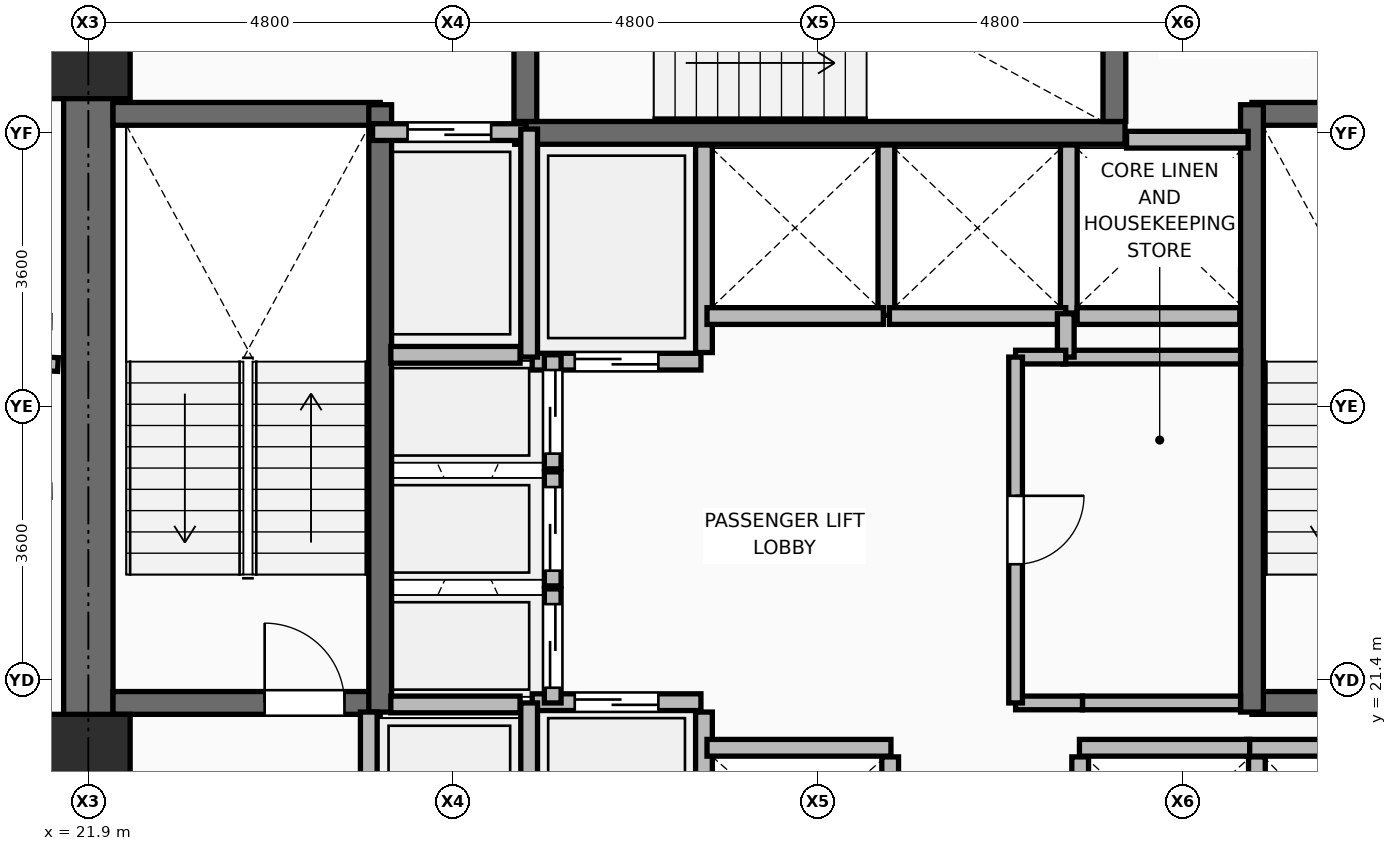
"""IFC4 building model, lengths in metres.
Left out: names, types, materials, properties, quantities, classifications, styles, units other than length and angle.
Written with IfcOpenShell. Run it as: python <this file> out.ifc"""

import sys

from ifc_helpers import new_model, si_unit, direction, frame, frame_2d, origin, origin_2d, place, context, subcontext, project, spatial, rectangle, extrude, element, fill, save


model = new_model("IFC4")
c1 = context("Model", 3, precision=1e-05, world=origin(), true_north=direction((0.0, 1.0)))
c2 = subcontext(c1, "Body", "Model", "MODEL_VIEW")
j1 = project(units=[si_unit("LENGTHUNIT", "METRE"), si_unit("PLANEANGLEUNIT", "RADIAN")], contexts=[c1])
p1 = place(None, origin())
s1 = spatial("IfcSite", under=j1, at=p1, CompositionType="ELEMENT")
p2 = place(p1, origin())
s2 = spatial("IfcBuilding", under=s1, at=p2, CompositionType="ELEMENT")
p3 = place(p2, frame((0.0, 0.0, 60.75)))
s3 = spatial("IfcBuildingStorey", under=s2, at=p3, CompositionType="ELEMENT", Elevation=60.75)
for number, where, z_axis, x_axis in (
    (1, (21.9, 20.4, 0.0), (0.0, 0.0, 1.0), (1.0, 0.0, 0.0)),
    (2, (21.9, 29.6, 0.0), (0.0, 0.0, 1.0), (1.0, 0.0, 0.0)),
):
    element("IfcColumn", number, at=place(p3, frame(where, z_axis=z_axis, x_axis=x_axis)), inside=s3, PredefinedType="COLUMN", context=c2, shape_type="SweptSolid", body=[
        extrude(rectangle(XDim=1.1, YDim=1.1, at=origin_2d()), origin(), (0.0, 0.0, 1.0), 3.75),
    ])
p4 = place(p3, frame((30.0, 18.08, 0.0), z_axis=(0.0, 0.0, 1.0), x_axis=(0.0, 1.0, 0.0)))
e3 = element("IfcWall", 3, at=p4, inside=s3, PredefinedType="PARTITIONING", context=c2, shape_type="SweptSolid", body=[
    extrude(rectangle(XDim=2.9, YDim=0.22, at=frame_2d((1.45, 0.0))), origin(), (0.0, 0.0, 1.0), 3.545),
])
for number, where, z_axis, x_axis in (
    (4, (32.45, 17.92, 0.0), (0.0, 0.0, 1.0), (0.0, 1.0, 0.0)),
    (5, (34.95, 17.92, 0.0), (0.0, 0.0, 1.0), (0.0, 1.0, 0.0)),
):
    element("IfcWall", number, at=place(p3, frame(where, z_axis=z_axis, x_axis=x_axis)), inside=s3, PredefinedType="PARTITIONING", context=c2, shape_type="SweptSolid", body=[
        extrude(rectangle(XDim=2.47, YDim=0.22, at=frame_2d((1.235, 0.0))), origin(), (0.0, 0.0, 1.0), 2.928),
    ])
p5 = place(p3, frame((37.275, 18.08, 0.0), z_axis=(0.0, 0.0, 1.0), x_axis=(0.0, 1.0, 0.0)))
e6 = element("IfcWall", 6, at=p5, inside=s3, PredefinedType="PARTITIONING", context=c2, shape_type="SweptSolid", body=[
    extrude(rectangle(XDim=2.31, YDim=0.22, at=frame_2d((1.155, 0.0))), origin(), (0.0, 0.0, 1.0), 3.545),
])
p6 = place(p3, frame((30.0, 25.71, 0.0), z_axis=(0.0, 0.0, 1.0), x_axis=(0.0, 1.0, 0.0)))
e7 = element("IfcWall", 7, at=p6, inside=s3, PredefinedType="PARTITIONING", context=c2, shape_type="SweptSolid", body=[
    extrude(rectangle(XDim=2.73, YDim=0.22, at=frame_2d((1.365, 0.0))), origin(), (0.0, 0.0, 1.0), 3.545),
])
p7 = place(p3, frame((32.4, 26.2, 0.0), z_axis=(0.0, 0.0, 1.0), x_axis=(0.0, 1.0, 0.0)))
e8 = element("IfcWall", 8, at=p7, inside=s3, PredefinedType="PARTITIONING", context=c2, shape_type="SweptSolid", body=[
    extrude(rectangle(XDim=2.24, YDim=0.22, at=frame_2d((1.12, 0.0))), origin(), (0.0, 0.0, 1.0), 3.545),
])
p8 = place(p3, frame((34.8, 26.23, 0.0), z_axis=(0.0, 0.0, 1.0), x_axis=(0.0, 1.0, 0.0)))
e9 = element("IfcWall", 9, at=p8, inside=s3, PredefinedType="PARTITIONING", context=c2, shape_type="SweptSolid", body=[
    extrude(rectangle(XDim=2.21, YDim=0.22, at=frame_2d((1.105, 0.0))), origin(), (0.0, 0.0, 1.0), 3.545),
])
p9 = place(p3, frame((34.91, 26.19, 0.0), z_axis=(0.0, 0.0, 1.0), x_axis=(1.0, 0.0, 0.0)))
e10 = element("IfcWall", 10, at=p9, inside=s3, PredefinedType="PARTITIONING", context=c2, shape_type="SweptSolid", body=[
    extrude(rectangle(XDim=2.14, YDim=0.22, at=frame_2d((1.07, 0.0))), origin(), (0.0, 0.0, 1.0), 3.545),
])
p10 = place(p3, frame((21.9, 18.125, 0.0), z_axis=(0.0, 0.0, 1.0), x_axis=(0.0, 1.0, 0.0)))
e11 = element("IfcWall", 11, at=p10, inside=s3, PredefinedType="SHEAR", context=c2, shape_type="SweptSolid", body=[
    extrude(rectangle(XDim=14.0, YDim=0.65, at=frame_2d((7.0, 0.0))), origin(), (0.0, 0.0, 1.0), 3.57),
])
p11 = place(p3, frame((22.225, 21.1, 0.0), z_axis=(0.0, 0.0, 1.0), x_axis=(1.0, 0.0, 0.0)))
e12 = element("IfcWall", 12, at=p11, inside=s3, PredefinedType="SHEAR", context=c2, shape_type="SweptSolid", body=[
    extrude(rectangle(XDim=3.515, YDim=0.3, at=frame_2d((1.757, 0.0))), origin(), (0.0, 0.0, 1.0), 3.57),
])
p12 = place(p11, frame((1.995, 0.0, 0.0)))
e13 = element("IfcOpeningElement", 13, at=p12, cuts=e12, PredefinedType="OPENING", context=c2, shape_type="SweptSolid", body=[
    extrude(rectangle(XDim=1.05, YDim=2.1, at=frame_2d((0.525, 1.05))), frame((0.0, 0.16, 0.0), z_axis=(0.0, -1.0, 0.0), x_axis=(1.0, 0.0, 0.0)), (0.0, 0.0, 1.0), 0.32),
])
p13 = place(p3, frame((22.225, 28.85, 0.0), z_axis=(0.0, 0.0, 1.0), x_axis=(1.0, 0.0, 0.0)))
e14 = element("IfcWall", 14, at=p13, inside=s3, PredefinedType="SHEAR", context=c2, shape_type="SweptSolid", body=[
    extrude(rectangle(XDim=3.515, YDim=0.3, at=frame_2d((1.757, 0.0))), origin(), (0.0, 0.0, 1.0), 3.57),
])
p14 = place(p3, frame((25.74, 20.98, 0.0), z_axis=(0.0, 0.0, 1.0), x_axis=(0.0, 1.0, 0.0)))
e15 = element("IfcWall", 15, at=p14, inside=s3, PredefinedType="SHEAR", context=c2, shape_type="SweptSolid", body=[
    extrude(rectangle(XDim=7.99, YDim=0.3, at=frame_2d((3.995, 0.0))), origin(), (0.0, 0.0, 1.0), 3.57),
])
for number, where, z_axis, x_axis in (
    (16, (37.21, 21.1, 0.0), (0.0, 0.0, 1.0), (1.0, 0.0, 0.0)),
    (17, (37.21, 28.85, 0.0), (0.0, 0.0, 1.0), (1.0, 0.0, 0.0)),
):
    element("IfcWall", number, at=place(p3, frame(where, z_axis=z_axis, x_axis=x_axis)), inside=s3, PredefinedType="SHEAR", context=c2, shape_type="SweptSolid", body=[
        extrude(rectangle(XDim=3.565, YDim=0.3, at=frame_2d((1.782, 0.0))), origin(), (0.0, 0.0, 1.0), 3.57),
    ])
p15 = place(p3, frame((37.21, 20.98, 0.0), z_axis=(0.0, 0.0, 1.0), x_axis=(0.0, 1.0, 0.0)))
e18 = element("IfcWall", 18, at=p15, inside=s3, PredefinedType="SHEAR", context=c2, shape_type="SweptSolid", body=[
    extrude(rectangle(XDim=7.99, YDim=0.3, at=frame_2d((3.995, 0.0))), origin(), (0.0, 0.0, 1.0), 3.57),
])
p16 = place(p3, frame((27.51, 28.6, 0.0), z_axis=(0.0, 0.0, 1.0), x_axis=(1.0, 0.0, 0.0)))
e19 = element("IfcWall", 19, at=p16, inside=s3, PredefinedType="SHEAR", context=c2, shape_type="SweptSolid", body=[
    extrude(rectangle(XDim=8.03, YDim=0.3, at=frame_2d((4.015, 0.0))), origin(), (0.0, 0.0, 1.0), 3.57),
])
p17 = place(p3, frame((27.65, 28.75, 0.0), z_axis=(0.0, 0.0, 1.0), x_axis=(0.0, 1.0, 0.0)))
e20 = element("IfcWall", 20, at=p17, inside=s3, PredefinedType="SHEAR", context=c2, shape_type="SweptSolid", body=[
    extrude(rectangle(XDim=3.375, YDim=0.3, at=frame_2d((1.688, 0.0))), origin(), (0.0, 0.0, 1.0), 3.57),
])
p18 = place(p17, frame((1.0, 0.0, 0.0)))
e21 = element("IfcOpeningElement", 21, at=p18, cuts=e20, PredefinedType="OPENING", context=c2, shape_type="SweptSolid", body=[
    extrude(rectangle(XDim=1.05, YDim=2.1, at=frame_2d((0.525, 1.05))), frame((0.0, 0.16, 0.0), z_axis=(0.0, -1.0, 0.0), x_axis=(1.0, 0.0, 0.0)), (0.0, 0.0, 1.0), 0.32),
])
p19 = place(p3, frame((35.4, 28.75, 0.0), z_axis=(0.0, 0.0, 1.0), x_axis=(0.0, 1.0, 0.0)))
e22 = element("IfcWall", 22, at=p19, inside=s3, PredefinedType="SHEAR", context=c2, shape_type="SweptSolid", body=[
    extrude(rectangle(XDim=3.375, YDim=0.3, at=frame_2d((1.688, 0.0))), origin(), (0.0, 0.0, 1.0), 3.57),
])
p20 = place(p3, frame((25.59, 18.22, 0.0), z_axis=(0.0, 0.0, 1.0), x_axis=(0.0, 1.0, 0.0)))
e23 = element("IfcWall", 23, at=p20, inside=s3, PredefinedType="PARTITIONING", context=c2, shape_type="SweptSolid", body=[
    extrude(rectangle(XDim=2.76, YDim=0.22, at=frame_2d((1.38, 0.0))), origin(), (0.0, 0.0, 1.0), 3.55),
])
p21 = place(p20, frame((0.83, 0.0, 0.0)))
e24 = element("IfcOpeningElement", 24, at=p21, cuts=e23, PredefinedType="OPENING", context=c2, shape_type="SweptSolid", body=[
    extrude(rectangle(XDim=1.1, YDim=2.2, at=frame_2d((0.55, 1.1))), frame((0.0, 0.12, 0.0), z_axis=(0.0, -1.0, 0.0), x_axis=(1.0, 0.0, 0.0)), (0.0, 0.0, 1.0), 0.24),
])
p22 = place(p3, frame((25.64, 28.61, 0.0), z_axis=(0.0, 0.0, 1.0), x_axis=(1.0, 0.0, 0.0)))
e25 = element("IfcWall", 25, at=p22, inside=s3, PredefinedType="PARTITIONING", context=c2, shape_type="SweptSolid", body=[
    extrude(rectangle(XDim=2.02, YDim=0.22, at=frame_2d((1.01, 0.0))), origin(), (0.0, 0.0, 1.0), 3.55),
])
p23 = place(p22, frame((0.46, 0.0, 0.0)))
e26 = element("IfcOpeningElement", 26, at=p23, cuts=e25, PredefinedType="OPENING", context=c2, shape_type="SweptSolid", body=[
    extrude(rectangle(XDim=1.1, YDim=2.2, at=frame_2d((0.55, 1.1))), frame((0.0, 0.12, 0.0), z_axis=(0.0, -1.0, 0.0), x_axis=(1.0, 0.0, 0.0)), (0.0, 0.0, 1.0), 0.24),
])
p24 = place(p3, frame((27.74, 21.11, 0.0), z_axis=(0.0, 0.0, 1.0), x_axis=(1.0, 0.0, 0.0)))
e27 = element("IfcWall", 27, at=p24, inside=s3, PredefinedType="PARTITIONING", context=c2, shape_type="SweptSolid", body=[
    extrude(rectangle(XDim=2.22, YDim=0.22, at=frame_2d((1.11, 0.0))), origin(), (0.0, 0.0, 1.0), 3.55),
])
p25 = place(p24, frame((0.56, 0.0, 0.0)))
e28 = element("IfcOpeningElement", 28, at=p25, cuts=e27, PredefinedType="OPENING", context=c2, shape_type="SweptSolid", body=[
    extrude(rectangle(XDim=1.1, YDim=2.2, at=frame_2d((0.55, 1.1))), frame((0.0, 0.12, 0.0), z_axis=(0.0, -1.0, 0.0), x_axis=(1.0, 0.0, 0.0)), (0.0, 0.0, 1.0), 0.24),
])
p26 = place(p3, frame((27.74, 25.59, 0.0), z_axis=(0.0, 0.0, 1.0), x_axis=(1.0, 0.0, 0.0)))
e29 = element("IfcWall", 29, at=p26, inside=s3, PredefinedType="PARTITIONING", context=c2, shape_type="SweptSolid", body=[
    extrude(rectangle(XDim=2.22, YDim=0.22, at=frame_2d((1.11, 0.0))), origin(), (0.0, 0.0, 1.0), 3.55),
])
p27 = place(p26, frame((0.56, 0.0, 0.0)))
e30 = element("IfcOpeningElement", 30, at=p27, cuts=e29, PredefinedType="OPENING", context=c2, shape_type="SweptSolid", body=[
    extrude(rectangle(XDim=1.1, YDim=2.2, at=frame_2d((0.55, 1.1))), frame((0.0, 0.12, 0.0), z_axis=(0.0, -1.0, 0.0), x_axis=(1.0, 0.0, 0.0)), (0.0, 0.0, 1.0), 0.24),
])
p28 = place(p3, frame((30.04, 20.51, 0.0), z_axis=(0.0, 0.0, 1.0), x_axis=(1.0, 0.0, 0.0)))
e31 = element("IfcWall", 31, at=p28, inside=s3, PredefinedType="PARTITIONING", context=c2, shape_type="SweptSolid", body=[
    extrude(rectangle(XDim=2.42, YDim=0.22, at=frame_2d((1.21, 0.0))), origin(), (0.0, 0.0, 1.0), 3.55),
])
for number, where, z_axis, x_axis in (
    (32, (37.14, 20.51, 0.0), (0.0, 0.0, 1.0), (1.0, 0.0, 0.0)),
    (33, (34.94, 20.51, 0.0), (0.0, 0.0, 1.0), (1.0, 0.0, 0.0)),
):
    element("IfcWall", number, at=place(p3, frame(where, z_axis=z_axis, x_axis=x_axis)), inside=s3, PredefinedType="PARTITIONING", context=c2, shape_type="SweptSolid", body=[
        extrude(rectangle(XDim=2.24, YDim=0.22, at=frame_2d((1.12, 0.0))), origin(), (0.0, 0.0, 1.0), 3.55),
    ])
for number, where, z_axis, x_axis in (
    (34, (30.04, 26.19, 0.0), (0.0, 0.0, 1.0), (1.0, 0.0, 0.0)),
    (35, (32.44, 26.19, 0.0), (0.0, 0.0, 1.0), (1.0, 0.0, 0.0)),
):
    element("IfcWall", number, at=place(p3, frame(where, z_axis=z_axis, x_axis=x_axis)), inside=s3, PredefinedType="PARTITIONING", context=c2, shape_type="SweptSolid", body=[
        extrude(rectangle(XDim=2.32, YDim=0.22, at=frame_2d((1.16, 0.0))), origin(), (0.0, 0.0, 1.0), 3.55),
    ])
p29 = place(p3, frame((35.56, 28.51, 0.0), z_axis=(0.0, 0.0, 1.0), x_axis=(1.0, 0.0, 0.0)))
e36 = element("IfcWall", 36, at=p29, inside=s3, PredefinedType="PARTITIONING", context=c2, shape_type="SweptSolid", body=[
    extrude(rectangle(XDim=1.6, YDim=0.22, at=frame_2d((0.8, 0.0))), origin(), (0.0, 0.0, 1.0), 3.55),
])
p30 = place(p3, frame((28.01, 21.1, 0.0), z_axis=(0.0, 0.0, 1.0), x_axis=(0.0, 1.0, 0.0)))
e37 = element("IfcWall", 37, at=p30, inside=s3, PredefinedType="PARTITIONING", context=c2, shape_type="SweptSolid", body=[
    extrude(rectangle(XDim=1.5, YDim=0.22, at=frame_2d((0.75, 0.0))), origin(), (0.0, 0.0, 1.0), 3.55),
])
p31 = place(p30, frame((0.2, 0.0, 0.0)))
e38 = element("IfcOpeningElement", 38, at=p31, cuts=e37, PredefinedType="OPENING", context=c2, shape_type="SweptSolid", body=[
    extrude(rectangle(XDim=1.1, YDim=2.2, at=frame_2d((0.55, 1.1))), frame((0.0, 0.12, 0.0), z_axis=(0.0, -1.0, 0.0), x_axis=(1.0, 0.0, 0.0)), (0.0, 0.0, 1.0), 0.24),
])
p32 = place(p3, frame((28.01, 22.64, 0.0), z_axis=(0.0, 0.0, 1.0), x_axis=(0.0, 1.0, 0.0)))
e39 = element("IfcWall", 39, at=p32, inside=s3, PredefinedType="PARTITIONING", context=c2, shape_type="SweptSolid", body=[
    extrude(rectangle(XDim=1.5, YDim=0.22, at=frame_2d((0.75, 0.0))), origin(), (0.0, 0.0, 1.0), 3.55),
])
p33 = place(p32, frame((0.2, 0.0, 0.0)))
e40 = element("IfcOpeningElement", 40, at=p33, cuts=e39, PredefinedType="OPENING", context=c2, shape_type="SweptSolid", body=[
    extrude(rectangle(XDim=1.1, YDim=2.2, at=frame_2d((0.55, 1.1))), frame((0.0, 0.12, 0.0), z_axis=(0.0, -1.0, 0.0), x_axis=(1.0, 0.0, 0.0)), (0.0, 0.0, 1.0), 0.24),
])
p34 = place(p3, frame((28.01, 24.18, 0.0), z_axis=(0.0, 0.0, 1.0), x_axis=(0.0, 1.0, 0.0)))
e41 = element("IfcWall", 41, at=p34, inside=s3, PredefinedType="PARTITIONING", context=c2, shape_type="SweptSolid", body=[
    extrude(rectangle(XDim=1.5, YDim=0.22, at=frame_2d((0.75, 0.0))), origin(), (0.0, 0.0, 1.0), 3.55),
])
p35 = place(p34, frame((0.2, 0.0, 0.0)))
e42 = element("IfcOpeningElement", 42, at=p35, cuts=e41, PredefinedType="OPENING", context=c2, shape_type="SweptSolid", body=[
    extrude(rectangle(XDim=1.1, YDim=2.2, at=frame_2d((0.55, 1.1))), frame((0.0, 0.12, 0.0), z_axis=(0.0, -1.0, 0.0), x_axis=(1.0, 0.0, 0.0)), (0.0, 0.0, 1.0), 0.24),
])
p36 = place(p3, frame((27.7, 18.15, 0.0), z_axis=(0.0, 0.0, 1.0), x_axis=(0.0, 1.0, 0.0)))
e43 = element("IfcWall", 43, at=p36, inside=s3, PredefinedType="PARTITIONING", context=c2, shape_type="SweptSolid", body=[
    extrude(rectangle(XDim=2.95, YDim=0.22, at=frame_2d((1.475, 0.0))), origin(), (0.0, 0.0, 1.0), 3.55),
])
p37 = place(p3, frame((27.7, 25.65, 0.0), z_axis=(0.0, 0.0, 1.0), x_axis=(0.0, 1.0, 0.0)))
e44 = element("IfcWall", 44, at=p37, inside=s3, PredefinedType="PARTITIONING", context=c2, shape_type="SweptSolid", body=[
    extrude(rectangle(XDim=3.0, YDim=0.22, at=frame_2d((1.5, 0.0))), origin(), (0.0, 0.0, 1.0), 3.55),
])
for number, where, z_axis, x_axis in (
    (45, (25.88, 21.08, 0.0), (0.0, 0.0, 1.0), (1.0, 0.0, 0.0)),
    (46, (25.88, 25.68, 0.0), (0.0, 0.0, 1.0), (1.0, 0.0, 0.0)),
):
    element("IfcWall", number, at=place(p3, frame(where, z_axis=z_axis, x_axis=x_axis)), inside=s3, PredefinedType="PARTITIONING", context=c2, shape_type="SweptSolid", body=[
        extrude(rectangle(XDim=1.7, YDim=0.22, at=frame_2d((0.85, 0.0))), origin(), (0.0, 0.0, 1.0), 3.55),
    ])
p38 = place(p3, frame((34.98, 21.1, 0.0), z_axis=(0.0, 0.0, 1.0), x_axis=(1.0, 0.0, 0.0)))
e47 = element("IfcWall", 47, at=p38, inside=s3, PredefinedType="PARTITIONING", context=c2, shape_type="SweptSolid", body=[
    extrude(rectangle(XDim=2.08, YDim=0.18, at=frame_2d((1.04, 0.0))), origin(), (0.0, 0.0, 1.0), 3.55),
])
p39 = place(p3, frame((34.72, 25.65, 0.0), z_axis=(0.0, 0.0, 1.0), x_axis=(1.0, 0.0, 0.0)))
e48 = element("IfcWall", 48, at=p39, inside=s3, PredefinedType="PARTITIONING", context=c2, shape_type="SweptSolid", body=[
    extrude(rectangle(XDim=2.34, YDim=0.18, at=frame_2d((1.17, 0.0))), origin(), (0.0, 0.0, 1.0), 3.55),
])
p40 = place(p3, frame((34.76, 25.65, 0.0), z_axis=(0.0, 0.0, 1.0), x_axis=(0.0, 1.0, 0.0)))
e49 = element("IfcWall", 49, at=p40, inside=s3, PredefinedType="PARTITIONING", context=c2, shape_type="SweptSolid", body=[
    extrude(rectangle(XDim=0.57, YDim=0.22, at=frame_2d((0.285, 0.0))), origin(), (0.0, 0.0, 1.0), 3.55),
])
p41 = place(p3, frame((34.1, 21.1, 0.0), z_axis=(0.0, 0.0, 1.0), x_axis=(1.0, 0.0, 0.0)))
e50 = element("IfcWall", 50, at=p41, inside=s3, PredefinedType="PARTITIONING", context=c2, shape_type="SweptSolid", body=[
    extrude(rectangle(XDim=0.88, YDim=0.18, at=frame_2d((0.44, 0.0))), origin(), (0.0, 0.0, 1.0), 3.55),
])
p42 = place(p3, frame((34.1, 25.65, 0.0), z_axis=(0.0, 0.0, 1.0), x_axis=(1.0, 0.0, 0.0)))
e51 = element("IfcWall", 51, at=p42, inside=s3, PredefinedType="PARTITIONING", context=c2, shape_type="SweptSolid", body=[
    extrude(rectangle(XDim=0.66, YDim=0.18, at=frame_2d((0.33, 0.0))), origin(), (0.0, 0.0, 1.0), 3.55),
])
p43 = place(p3, frame((34.1, 21.1, 0.0), z_axis=(0.0, 0.0, 1.0), x_axis=(0.0, 1.0, 0.0)))
e52 = element("IfcWall", 52, at=p43, inside=s3, PredefinedType="PARTITIONING", context=c2, shape_type="SweptSolid", body=[
    extrude(rectangle(XDim=4.55, YDim=0.18, at=frame_2d((2.275, 0.0))), origin(), (0.0, 0.0, 1.0), 3.55),
])
p44 = place(p43, frame((1.825, 0.0, 0.0)))
e53 = element("IfcOpeningElement", 53, at=p44, cuts=e52, PredefinedType="OPENING", context=c2, shape_type="SweptSolid", body=[
    extrude(rectangle(XDim=0.9, YDim=2.1, at=frame_2d((0.45, 1.05))), frame((0.0, 0.1, 0.0), z_axis=(0.0, -1.0, 0.0), x_axis=(1.0, 0.0, 0.0)), (0.0, 0.0, 1.0), 0.2),
])
p45 = place(p3, frame((21.5, 25.552, 0.0), z_axis=(0.0, 0.0, 1.0), x_axis=(-0.998476368936, 0.055180981107, 0.0)))
e54 = element("IfcWall", 54, at=p45, inside=s3, PredefinedType="PARTITIONING", context=c2, shape_type="SweptSolid", body=[
    extrude(rectangle(XDim=17.777, YDim=0.18, at=frame_2d((8.889, 0.0))), origin(), (0.0, 0.0, 1.0), 2.595),
])
p46 = place(p12, origin())
e55 = element("IfcDoor", 55, at=p46, inside=s3, OperationType="SINGLE_SWING_LEFT", PredefinedType="DOOR", context=c2, shape_type="SweptSolid", body=[
    extrude(rectangle(XDim=1.05, YDim=2.1, at=frame_2d((0.525, 1.05))), frame((0.0, 0.025, 0.0), z_axis=(0.0, -1.0, 0.0), x_axis=(1.0, 0.0, 0.0)), (0.0, 0.0, 1.0), 0.05),
])
fill(e13, e55)
p47 = place(p23, origin())
e56 = element("IfcDoor", 56, at=p47, inside=s3, OperationType="DOUBLE_DOOR_SLIDING", PredefinedType="DOOR", context=c2, shape_type="SweptSolid", body=[
    extrude(rectangle(XDim=1.1, YDim=2.2, at=frame_2d((0.55, 1.1))), frame((0.0, 0.025, 0.0), z_axis=(0.0, -1.0, 0.0), x_axis=(1.0, 0.0, 0.0)), (0.0, 0.0, 1.0), 0.05),
])
fill(e26, e56)
p48 = place(p25, origin())
e57 = element("IfcDoor", 57, at=p48, inside=s3, OperationType="DOUBLE_DOOR_SLIDING", PredefinedType="DOOR", context=c2, shape_type="SweptSolid", body=[
    extrude(rectangle(XDim=1.1, YDim=2.2, at=frame_2d((0.55, 1.1))), frame((0.0, 0.025, 0.0), z_axis=(0.0, -1.0, 0.0), x_axis=(1.0, 0.0, 0.0)), (0.0, 0.0, 1.0), 0.05),
])
fill(e28, e57)
p49 = place(p27, frame((1.1, 0.0, 0.0), z_axis=(0.0, 0.0, 1.0), x_axis=(-1.0, 0.0, 0.0)))
e58 = element("IfcDoor", 58, at=p49, inside=s3, OperationType="DOUBLE_DOOR_SLIDING", PredefinedType="DOOR", context=c2, shape_type="SweptSolid", body=[
    extrude(rectangle(XDim=1.1, YDim=2.2, at=frame_2d((0.55, 1.1))), frame((0.0, 0.025, 0.0), z_axis=(0.0, -1.0, 0.0), x_axis=(1.0, 0.0, 0.0)), (0.0, 0.0, 1.0), 0.05),
])
fill(e30, e58)
p50 = place(p31, frame((1.1, 0.0, 0.0), z_axis=(0.0, 0.0, 1.0), x_axis=(-1.0, 0.0, 0.0)))
e59 = element("IfcDoor", 59, at=p50, inside=s3, OperationType="DOUBLE_DOOR_SLIDING", PredefinedType="DOOR", context=c2, shape_type="SweptSolid", body=[
    extrude(rectangle(XDim=1.1, YDim=2.2, at=frame_2d((0.55, 1.1))), frame((0.0, 0.025, 0.0), z_axis=(0.0, -1.0, 0.0), x_axis=(1.0, 0.0, 0.0)), (0.0, 0.0, 1.0), 0.05),
])
fill(e38, e59)
p51 = place(p33, frame((1.1, 0.0, 0.0), z_axis=(0.0, 0.0, 1.0), x_axis=(-1.0, 0.0, 0.0)))
e60 = element("IfcDoor", 60, at=p51, inside=s3, OperationType="DOUBLE_DOOR_SLIDING", PredefinedType="DOOR", context=c2, shape_type="SweptSolid", body=[
    extrude(rectangle(XDim=1.1, YDim=2.2, at=frame_2d((0.55, 1.1))), frame((0.0, 0.025, 0.0), z_axis=(0.0, -1.0, 0.0), x_axis=(1.0, 0.0, 0.0)), (0.0, 0.0, 1.0), 0.05),
])
fill(e40, e60)
p52 = place(p35, frame((1.1, 0.0, 0.0), z_axis=(0.0, 0.0, 1.0), x_axis=(-1.0, 0.0, 0.0)))
e61 = element("IfcDoor", 61, at=p52, inside=s3, OperationType="DOUBLE_DOOR_SLIDING", PredefinedType="DOOR", context=c2, shape_type="SweptSolid", body=[
    extrude(rectangle(XDim=1.1, YDim=2.2, at=frame_2d((0.55, 1.1))), frame((0.0, 0.025, 0.0), z_axis=(0.0, -1.0, 0.0), x_axis=(1.0, 0.0, 0.0)), (0.0, 0.0, 1.0), 0.05),
])
fill(e42, e61)
p53 = place(p44, frame((0.9, 0.0, 0.0), z_axis=(0.0, 0.0, 1.0), x_axis=(-1.0, 0.0, 0.0)))
e62 = element("IfcDoor", 62, at=p53, inside=s3, OperationType="SINGLE_SWING_LEFT", PredefinedType="DOOR", context=c2, shape_type="SweptSolid", body=[
    extrude(rectangle(XDim=0.9, YDim=2.1, at=frame_2d((0.45, 1.05))), frame((0.0, 0.025, 0.0), z_axis=(0.0, -1.0, 0.0), x_axis=(1.0, 0.0, 0.0)), (0.0, 0.0, 1.0), 0.05),
])
fill(e53, e62)
save(model, sys.argv[1])
